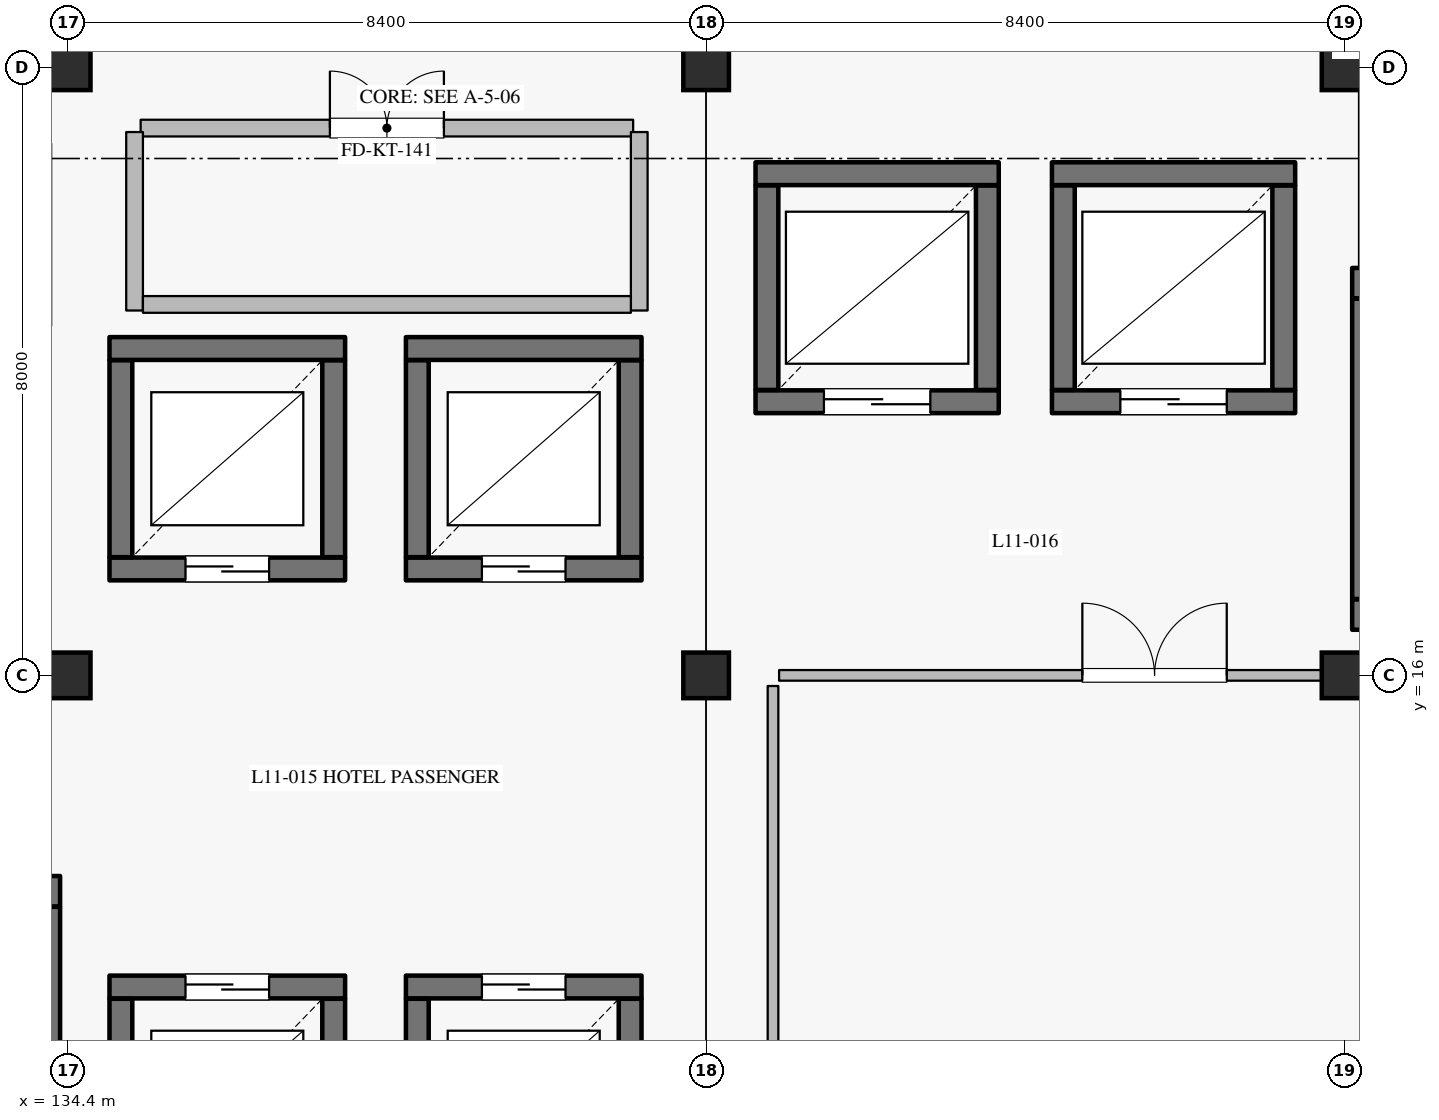
"""IFC4 building model, lengths in metres.
Left out: names, types, materials, properties, quantities, classifications, styles, units other than length and angle.
Written with IfcOpenShell. Run it as: python <this file> out.ifc"""

import sys

from ifc_helpers import new_model, si_unit, direction, frame, frame_2d, origin, origin_2d, place, context, subcontext, project, spatial, rectangle, extrude, element, fill, save


model = new_model("IFC4")
c1 = context("Model", 3, precision=1e-05, world=origin(), true_north=direction((0.0, 1.0)))
c2 = subcontext(c1, "Body", "Model", "MODEL_VIEW")
j1 = project(units=[si_unit("LENGTHUNIT", "METRE"), si_unit("PLANEANGLEUNIT", "RADIAN")], contexts=[c1])
p1 = place(None, origin())
s1 = spatial("IfcSite", under=j1, at=p1, CompositionType="ELEMENT")
p2 = place(p1, origin())
s2 = spatial("IfcBuilding", under=s1, at=p2, CompositionType="ELEMENT")
p3 = place(p2, frame((0.0, 0.0, 47.4)))
s3 = spatial("IfcBuildingStorey", under=s2, at=p3, CompositionType="ELEMENT", Elevation=47.4)
for number, where, z_axis, x_axis in (
    (1, (134.4, 16.0, 0.0), (0.0, 0.0, 1.0), (1.0, 0.0, 0.0)),
    (2, (142.8, 16.0, 0.0), (0.0, 0.0, 1.0), (1.0, 0.0, 0.0)),
    (3, (151.2, 24.0, 0.0), (0.0, 0.0, 1.0), (1.0, 0.0, 0.0)),
    (4, (134.4, 24.0, 0.0), (0.0, 0.0, 1.0), (1.0, 0.0, 0.0)),
    (5, (142.8, 24.0, 0.0), (0.0, 0.0, 1.0), (1.0, 0.0, 0.0)),
    (6, (151.2, 16.0, 0.0), (0.0, 0.0, 1.0), (1.0, 0.0, 0.0)),
):
    element("IfcColumn", number, at=place(p3, frame(where, z_axis=z_axis, x_axis=x_axis)), inside=s3, PredefinedType="COLUMN", context=c2, shape_type="SweptSolid", body=[
        extrude(rectangle(XDim=0.6, YDim=0.6, at=origin_2d()), origin(), (0.0, 0.0, 1.0), 4.2),
    ])
p4 = place(p3, frame((134.95, 17.4, 0.0), z_axis=(0.0, 0.0, 1.0), x_axis=(1.0, 0.0, 0.0)))
e7 = element("IfcWall", 7, at=p4, inside=s3, PredefinedType="SHEAR", context=c2, shape_type="SweptSolid", body=[
    extrude(rectangle(XDim=3.1, YDim=0.3, at=frame_2d((1.55, 0.0))), origin(), (0.0, 0.0, 1.0), 3.935),
])
p5 = place(p4, frame((1.0, 0.0, 0.0)))
e8 = element("IfcOpeningElement", 8, at=p5, cuts=e7, PredefinedType="OPENING", context=c2, shape_type="SweptSolid", body=[
    extrude(rectangle(XDim=1.1, YDim=2.2, at=frame_2d((0.55, 1.1))), frame((0.0, 0.16, 0.0), z_axis=(0.0, -1.0, 0.0), x_axis=(1.0, 0.0, 0.0)), (0.0, 0.0, 1.0), 0.32),
])
p6 = place(p3, frame((137.9, 17.555, 0.0), z_axis=(0.0, 0.0, 1.0), x_axis=(0.0, 1.0, 0.0)))
e9 = element("IfcWall", 9, at=p6, inside=s3, PredefinedType="SHEAR", context=c2, shape_type="SweptSolid", body=[
    extrude(rectangle(XDim=2.59, YDim=0.3, at=frame_2d((1.295, 0.0))), origin(), (0.0, 0.0, 1.0), 3.935),
])
p7 = place(p3, frame((138.05, 20.3, 0.0), z_axis=(0.0, 0.0, 1.0), x_axis=(-1.0, 0.0, 0.0)))
e10 = element("IfcWall", 10, at=p7, inside=s3, PredefinedType="SHEAR", context=c2, shape_type="SweptSolid", body=[
    extrude(rectangle(XDim=3.1, YDim=0.3, at=frame_2d((1.55, 0.0))), origin(), (0.0, 0.0, 1.0), 3.935),
])
p8 = place(p3, frame((135.1, 20.145, 0.0), z_axis=(0.0, 0.0, 1.0), x_axis=(0.0, -1.0, 0.0)))
e11 = element("IfcWall", 11, at=p8, inside=s3, PredefinedType="SHEAR", context=c2, shape_type="SweptSolid", body=[
    extrude(rectangle(XDim=2.59, YDim=0.3, at=frame_2d((1.295, 0.0))), origin(), (0.0, 0.0, 1.0), 3.935),
])
p9 = place(p3, frame((138.85, 17.4, 0.0), z_axis=(0.0, 0.0, 1.0), x_axis=(1.0, 0.0, 0.0)))
e12 = element("IfcWall", 12, at=p9, inside=s3, PredefinedType="SHEAR", context=c2, shape_type="SweptSolid", body=[
    extrude(rectangle(XDim=3.1, YDim=0.3, at=frame_2d((1.55, 0.0))), origin(), (0.0, 0.0, 1.0), 3.935),
])
p10 = place(p9, frame((1.0, 0.0, 0.0)))
e13 = element("IfcOpeningElement", 13, at=p10, cuts=e12, PredefinedType="OPENING", context=c2, shape_type="SweptSolid", body=[
    extrude(rectangle(XDim=1.1, YDim=2.2, at=frame_2d((0.55, 1.1))), frame((0.0, 0.16, 0.0), z_axis=(0.0, -1.0, 0.0), x_axis=(1.0, 0.0, 0.0)), (0.0, 0.0, 1.0), 0.32),
])
p11 = place(p3, frame((141.8, 17.555, 0.0), z_axis=(0.0, 0.0, 1.0), x_axis=(0.0, 1.0, 0.0)))
e14 = element("IfcWall", 14, at=p11, inside=s3, PredefinedType="SHEAR", context=c2, shape_type="SweptSolid", body=[
    extrude(rectangle(XDim=2.59, YDim=0.3, at=frame_2d((1.295, 0.0))), origin(), (0.0, 0.0, 1.0), 3.935),
])
p12 = place(p3, frame((141.95, 20.3, 0.0), z_axis=(0.0, 0.0, 1.0), x_axis=(-1.0, 0.0, 0.0)))
e15 = element("IfcWall", 15, at=p12, inside=s3, PredefinedType="SHEAR", context=c2, shape_type="SweptSolid", body=[
    extrude(rectangle(XDim=3.1, YDim=0.3, at=frame_2d((1.55, 0.0))), origin(), (0.0, 0.0, 1.0), 3.935),
])
for number, where, z_axis, x_axis in (
    (16, (139.0, 20.145, 0.0), (0.0, 0.0, 1.0), (0.0, -1.0, 0.0)),
    (17, (137.9, 9.155, 0.0), (0.0, 0.0, 1.0), (0.0, 1.0, 0.0)),
):
    element("IfcWall", number, at=place(p3, frame(where, z_axis=z_axis, x_axis=x_axis)), inside=s3, PredefinedType="SHEAR", context=c2, shape_type="SweptSolid", body=[
        extrude(rectangle(XDim=2.59, YDim=0.3, at=frame_2d((1.295, 0.0))), origin(), (0.0, 0.0, 1.0), 3.935),
    ])
p13 = place(p3, frame((138.05, 11.9, 0.0), z_axis=(0.0, 0.0, 1.0), x_axis=(-1.0, 0.0, 0.0)))
e18 = element("IfcWall", 18, at=p13, inside=s3, PredefinedType="SHEAR", context=c2, shape_type="SweptSolid", body=[
    extrude(rectangle(XDim=3.1, YDim=0.3, at=frame_2d((1.55, 0.0))), origin(), (0.0, 0.0, 1.0), 3.935),
])
p14 = place(p13, frame((1.0, 0.0, 0.0)))
e19 = element("IfcOpeningElement", 19, at=p14, cuts=e18, PredefinedType="OPENING", context=c2, shape_type="SweptSolid", body=[
    extrude(rectangle(XDim=1.1, YDim=2.2, at=frame_2d((0.55, 1.1))), frame((0.0, 0.16, 0.0), z_axis=(0.0, -1.0, 0.0), x_axis=(1.0, 0.0, 0.0)), (0.0, 0.0, 1.0), 0.32),
])
for number, where, z_axis, x_axis in (
    (20, (135.1, 11.745, 0.0), (0.0, 0.0, 1.0), (0.0, -1.0, 0.0)),
    (21, (141.8, 9.155, 0.0), (0.0, 0.0, 1.0), (0.0, 1.0, 0.0)),
):
    element("IfcWall", number, at=place(p3, frame(where, z_axis=z_axis, x_axis=x_axis)), inside=s3, PredefinedType="SHEAR", context=c2, shape_type="SweptSolid", body=[
        extrude(rectangle(XDim=2.59, YDim=0.3, at=frame_2d((1.295, 0.0))), origin(), (0.0, 0.0, 1.0), 3.935),
    ])
p15 = place(p3, frame((141.95, 11.9, 0.0), z_axis=(0.0, 0.0, 1.0), x_axis=(-1.0, 0.0, 0.0)))
e22 = element("IfcWall", 22, at=p15, inside=s3, PredefinedType="SHEAR", context=c2, shape_type="SweptSolid", body=[
    extrude(rectangle(XDim=3.1, YDim=0.3, at=frame_2d((1.55, 0.0))), origin(), (0.0, 0.0, 1.0), 3.935),
])
p16 = place(p15, frame((1.0, 0.0, 0.0)))
e23 = element("IfcOpeningElement", 23, at=p16, cuts=e22, PredefinedType="OPENING", context=c2, shape_type="SweptSolid", body=[
    extrude(rectangle(XDim=1.1, YDim=2.2, at=frame_2d((0.55, 1.1))), frame((0.0, 0.16, 0.0), z_axis=(0.0, -1.0, 0.0), x_axis=(1.0, 0.0, 0.0)), (0.0, 0.0, 1.0), 0.32),
])
p17 = place(p3, frame((139.0, 11.745, 0.0), z_axis=(0.0, 0.0, 1.0), x_axis=(0.0, -1.0, 0.0)))
e24 = element("IfcWall", 24, at=p17, inside=s3, PredefinedType="SHEAR", context=c2, shape_type="SweptSolid", body=[
    extrude(rectangle(XDim=2.59, YDim=0.3, at=frame_2d((1.295, 0.0))), origin(), (0.0, 0.0, 1.0), 3.935),
])
p18 = place(p3, frame((143.45, 19.6, 0.0), z_axis=(0.0, 0.0, 1.0), x_axis=(1.0, 0.0, 0.0)))
e25 = element("IfcWall", 25, at=p18, inside=s3, PredefinedType="SHEAR", context=c2, shape_type="SweptSolid", body=[
    extrude(rectangle(XDim=3.2, YDim=0.3, at=frame_2d((1.6, 0.0))), origin(), (0.0, 0.0, 1.0), 3.935),
])
p19 = place(p18, frame((0.9, 0.0, 0.0)))
e26 = element("IfcOpeningElement", 26, at=p19, cuts=e25, PredefinedType="OPENING", context=c2, shape_type="SweptSolid", body=[
    extrude(rectangle(XDim=1.4, YDim=2.35, at=frame_2d((0.7, 1.175))), frame((0.0, 0.16, 0.0), z_axis=(0.0, -1.0, 0.0), x_axis=(1.0, 0.0, 0.0)), (0.0, 0.0, 1.0), 0.32),
])
p20 = place(p3, frame((146.5, 19.755, 0.0), z_axis=(0.0, 0.0, 1.0), x_axis=(0.0, 1.0, 0.0)))
e27 = element("IfcWall", 27, at=p20, inside=s3, PredefinedType="SHEAR", context=c2, shape_type="SweptSolid", body=[
    extrude(rectangle(XDim=2.69, YDim=0.3, at=frame_2d((1.345, 0.0))), origin(), (0.0, 0.0, 1.0), 3.935),
])
p21 = place(p3, frame((146.65, 22.6, 0.0), z_axis=(0.0, 0.0, 1.0), x_axis=(-1.0, 0.0, 0.0)))
e28 = element("IfcWall", 28, at=p21, inside=s3, PredefinedType="SHEAR", context=c2, shape_type="SweptSolid", body=[
    extrude(rectangle(XDim=3.2, YDim=0.3, at=frame_2d((1.6, 0.0))), origin(), (0.0, 0.0, 1.0), 3.935),
])
p22 = place(p3, frame((143.6, 22.445, 0.0), z_axis=(0.0, 0.0, 1.0), x_axis=(0.0, -1.0, 0.0)))
e29 = element("IfcWall", 29, at=p22, inside=s3, PredefinedType="SHEAR", context=c2, shape_type="SweptSolid", body=[
    extrude(rectangle(XDim=2.69, YDim=0.3, at=frame_2d((1.345, 0.0))), origin(), (0.0, 0.0, 1.0), 3.935),
])
p23 = place(p3, frame((147.35, 19.6, 0.0), z_axis=(0.0, 0.0, 1.0), x_axis=(1.0, 0.0, 0.0)))
e30 = element("IfcWall", 30, at=p23, inside=s3, PredefinedType="SHEAR", context=c2, shape_type="SweptSolid", body=[
    extrude(rectangle(XDim=3.2, YDim=0.3, at=frame_2d((1.6, 0.0))), origin(), (0.0, 0.0, 1.0), 3.935),
])
p24 = place(p23, frame((0.9, 0.0, 0.0)))
e31 = element("IfcOpeningElement", 31, at=p24, cuts=e30, PredefinedType="OPENING", context=c2, shape_type="SweptSolid", body=[
    extrude(rectangle(XDim=1.4, YDim=2.35, at=frame_2d((0.7, 1.175))), frame((0.0, 0.16, 0.0), z_axis=(0.0, -1.0, 0.0), x_axis=(1.0, 0.0, 0.0)), (0.0, 0.0, 1.0), 0.32),
])
p25 = place(p3, frame((150.4, 19.755, 0.0), z_axis=(0.0, 0.0, 1.0), x_axis=(0.0, 1.0, 0.0)))
e32 = element("IfcWall", 32, at=p25, inside=s3, PredefinedType="SHEAR", context=c2, shape_type="SweptSolid", body=[
    extrude(rectangle(XDim=2.69, YDim=0.3, at=frame_2d((1.345, 0.0))), origin(), (0.0, 0.0, 1.0), 3.935),
])
p26 = place(p3, frame((150.55, 22.6, 0.0), z_axis=(0.0, 0.0, 1.0), x_axis=(-1.0, 0.0, 0.0)))
e33 = element("IfcWall", 33, at=p26, inside=s3, PredefinedType="SHEAR", context=c2, shape_type="SweptSolid", body=[
    extrude(rectangle(XDim=3.2, YDim=0.3, at=frame_2d((1.6, 0.0))), origin(), (0.0, 0.0, 1.0), 3.935),
])
p27 = place(p3, frame((147.5, 22.445, 0.0), z_axis=(0.0, 0.0, 1.0), x_axis=(0.0, -1.0, 0.0)))
e34 = element("IfcWall", 34, at=p27, inside=s3, PredefinedType="SHEAR", context=c2, shape_type="SweptSolid", body=[
    extrude(rectangle(XDim=2.69, YDim=0.3, at=frame_2d((1.345, 0.0))), origin(), (0.0, 0.0, 1.0), 3.935),
])
p28 = place(p3, frame((134.1, 9.005, 0.0), z_axis=(0.0, 0.0, 1.0), x_axis=(0.0, 1.0, 0.0)))
e35 = element("IfcWall", 35, at=p28, inside=s3, PredefinedType="SHEAR", context=c2, shape_type="SweptSolid", body=[
    extrude(rectangle(XDim=3.95, YDim=0.4, at=frame_2d((1.975, 0.0))), origin(), (0.0, 0.0, 1.0), 3.935),
])
p29 = place(p3, frame((126.15, 13.16, 0.0), z_axis=(0.0, 0.0, 1.0), x_axis=(1.0, 0.0, 0.0)))
e36 = element("IfcWall", 36, at=p29, inside=s3, PredefinedType="SHEAR", context=c2, shape_type="SweptSolid", body=[
    extrude(rectangle(XDim=8.15, YDim=0.4, at=frame_2d((4.075, 0.0))), origin(), (0.0, 0.0, 1.0), 3.935),
])
p30 = place(p29, frame((0.38, 0.0, 0.0)))
e37 = element("IfcOpeningElement", 37, at=p30, cuts=e36, PredefinedType="OPENING", context=c2, shape_type="SweptSolid", body=[
    extrude(rectangle(XDim=1.16, YDim=2.2, at=frame_2d((0.58, 1.1))), frame((0.0, 0.21, 0.0), z_axis=(0.0, -1.0, 0.0), x_axis=(1.0, 0.0, 0.0)), (0.0, 0.0, 1.0), 0.42),
])
p31 = place(p3, frame((151.3, 16.8, 0.0), z_axis=(0.0, 0.0, 1.0), x_axis=(1.0, 0.0, 0.0)))
e38 = element("IfcWall", 38, at=p31, inside=s3, PredefinedType="SHEAR", context=c2, shape_type="SweptSolid", body=[
    extrude(rectangle(XDim=8.15, YDim=0.4, at=frame_2d((4.075, 0.0))), origin(), (0.0, 0.0, 1.0), 3.935),
])
p32 = place(p3, frame((151.3, 21.16, 0.0), z_axis=(0.0, 0.0, 1.0), x_axis=(1.0, 0.0, 0.0)))
e39 = element("IfcWall", 39, at=p32, inside=s3, PredefinedType="SHEAR", context=c2, shape_type="SweptSolid", body=[
    extrude(rectangle(XDim=8.15, YDim=0.4, at=frame_2d((4.075, 0.0))), origin(), (0.0, 0.0, 1.0), 3.935),
])
p33 = place(p32, frame((0.43, 0.0, 0.0)))
e40 = element("IfcOpeningElement", 40, at=p33, cuts=e39, PredefinedType="OPENING", context=c2, shape_type="SweptSolid", body=[
    extrude(rectangle(XDim=1.16, YDim=2.2, at=frame_2d((0.58, 1.1))), frame((0.0, 0.21, 0.0), z_axis=(0.0, -1.0, 0.0), x_axis=(1.0, 0.0, 0.0)), (0.0, 0.0, 1.0), 0.42),
])
p34 = place(p3, frame((151.5, 17.005, 0.0), z_axis=(0.0, 0.0, 1.0), x_axis=(0.0, 1.0, 0.0)))
e41 = element("IfcWall", 41, at=p34, inside=s3, PredefinedType="SHEAR", context=c2, shape_type="SweptSolid", body=[
    extrude(rectangle(XDim=3.95, YDim=0.4, at=frame_2d((1.975, 0.0))), origin(), (0.0, 0.0, 1.0), 3.935),
])
p35 = place(p3, frame((151.5, 21.365, 0.0), z_axis=(0.0, 0.0, 1.0), x_axis=(0.0, 1.0, 0.0)))
e42 = element("IfcWall", 42, at=p35, inside=s3, PredefinedType="PARTITIONING", context=c2, shape_type="SweptSolid", body=[
    extrude(rectangle(XDim=5.82, YDim=0.22, at=frame_2d((2.91, 0.0))), origin(), (0.0, 0.0, 1.0), 3.935),
])
p36 = place(p3, frame((143.76, 16.0, 0.0), z_axis=(0.0, 0.0, 1.0), x_axis=(1.0, 0.0, 0.0)))
e43 = element("IfcWall", 43, at=p36, inside=s3, PredefinedType="PARTITIONING", context=c2, shape_type="SweptSolid", body=[
    extrude(rectangle(XDim=7.736, YDim=0.14, at=frame_2d((3.868, 0.0))), origin(), (0.0, 0.0, 1.0), 3.935),
])
p37 = place(p36, frame((3.99, 0.0, 0.0)))
e44 = element("IfcOpeningElement", 44, at=p37, cuts=e43, PredefinedType="OPENING", context=c2, shape_type="SweptSolid", body=[
    extrude(rectangle(XDim=1.9, YDim=2.4, at=frame_2d((0.95, 1.2))), frame((0.0, 0.08, 0.0), z_axis=(0.0, -1.0, 0.0), x_axis=(1.0, 0.0, 0.0)), (0.0, 0.0, 1.0), 0.16),
])
p38 = place(p3, frame((143.68, 8.85, 0.0), z_axis=(0.0, 0.0, 1.0), x_axis=(0.0, 1.0, 0.0)))
e45 = element("IfcWall", 45, at=p38, inside=s3, PredefinedType="PARTITIONING", context=c2, shape_type="SweptSolid", body=[
    extrude(rectangle(XDim=7.01, YDim=0.14, at=frame_2d((3.505, 0.0))), origin(), (0.0, 0.0, 1.0), 3.935),
])
p39 = place(p3, frame((135.36, 23.2, 0.0), z_axis=(0.0, 0.0, 1.0), x_axis=(1.0, 0.0, 0.0)))
e46 = element("IfcWall", 46, at=p39, inside=s3, PredefinedType="PARTITIONING", context=c2, shape_type="SweptSolid", body=[
    extrude(rectangle(XDim=6.48, YDim=0.22, at=frame_2d((3.24, 0.0))), origin(), (0.0, 0.0, 1.0), 3.935),
])
p40 = place(p39, frame((2.49, 0.0, 0.0)))
e47 = element("IfcOpeningElement", 47, at=p40, cuts=e46, PredefinedType="OPENING", context=c2, shape_type="SweptSolid", body=[
    extrude(rectangle(XDim=1.5, YDim=2.3, at=frame_2d((0.75, 1.15))), frame((0.0, 0.12, 0.0), z_axis=(0.0, -1.0, 0.0), x_axis=(1.0, 0.0, 0.0)), (0.0, 0.0, 1.0), 0.24),
])
for number, where, z_axis, x_axis in (
    (48, (135.28, 20.8, 0.0), (0.0, 0.0, 1.0), (0.0, 1.0, 0.0)),
    (49, (141.92, 20.8, 0.0), (0.0, 0.0, 1.0), (0.0, 1.0, 0.0)),
):
    element("IfcWall", number, at=place(p3, frame(where, z_axis=z_axis, x_axis=x_axis)), inside=s3, PredefinedType="PARTITIONING", context=c2, shape_type="SweptSolid", body=[
        extrude(rectangle(XDim=2.348, YDim=0.22, at=frame_2d((1.174, 0.0))), origin(), (0.0, 0.0, 1.0), 3.935),
    ])
p41 = place(p3, frame((135.39, 20.88, 0.0), z_axis=(0.0, 0.0, 1.0), x_axis=(1.0, 0.0, 0.0)))
e50 = element("IfcWall", 50, at=p41, inside=s3, PredefinedType="PARTITIONING", context=c2, shape_type="SweptSolid", body=[
    extrude(rectangle(XDim=6.42, YDim=0.22, at=frame_2d((3.21, 0.0))), origin(), (0.0, 0.0, 1.0), 3.935),
])
p42 = place(p5, origin())
e51 = element("IfcDoor", 51, at=p42, inside=s3, OperationType="DOUBLE_DOOR_SLIDING", PredefinedType="DOOR", context=c2, shape_type="SweptSolid", body=[
    extrude(rectangle(XDim=1.1, YDim=2.2, at=frame_2d((0.55, 1.1))), frame((0.0, 0.025, 0.0), z_axis=(0.0, -1.0, 0.0), x_axis=(1.0, 0.0, 0.0)), (0.0, 0.0, 1.0), 0.05),
])
fill(e8, e51)
p43 = place(p10, origin())
e52 = element("IfcDoor", 52, at=p43, inside=s3, OperationType="DOUBLE_DOOR_SLIDING", PredefinedType="DOOR", context=c2, shape_type="SweptSolid", body=[
    extrude(rectangle(XDim=1.1, YDim=2.2, at=frame_2d((0.55, 1.1))), frame((0.0, 0.025, 0.0), z_axis=(0.0, -1.0, 0.0), x_axis=(1.0, 0.0, 0.0)), (0.0, 0.0, 1.0), 0.05),
])
fill(e13, e52)
p44 = place(p14, origin())
e53 = element("IfcDoor", 53, at=p44, inside=s3, OperationType="DOUBLE_DOOR_SLIDING", PredefinedType="DOOR", context=c2, shape_type="SweptSolid", body=[
    extrude(rectangle(XDim=1.1, YDim=2.2, at=frame_2d((0.55, 1.1))), frame((0.0, 0.025, 0.0), z_axis=(0.0, -1.0, 0.0), x_axis=(1.0, 0.0, 0.0)), (0.0, 0.0, 1.0), 0.05),
])
fill(e19, e53)
p45 = place(p16, origin())
e54 = element("IfcDoor", 54, at=p45, inside=s3, OperationType="DOUBLE_DOOR_SLIDING", PredefinedType="DOOR", context=c2, shape_type="SweptSolid", body=[
    extrude(rectangle(XDim=1.1, YDim=2.2, at=frame_2d((0.55, 1.1))), frame((0.0, 0.025, 0.0), z_axis=(0.0, -1.0, 0.0), x_axis=(1.0, 0.0, 0.0)), (0.0, 0.0, 1.0), 0.05),
])
fill(e23, e54)
p46 = place(p19, origin())
e55 = element("IfcDoor", 55, at=p46, inside=s3, OperationType="DOUBLE_DOOR_SLIDING", PredefinedType="DOOR", context=c2, shape_type="SweptSolid", body=[
    extrude(rectangle(XDim=1.4, YDim=2.35, at=frame_2d((0.7, 1.175))), frame((0.0, 0.025, 0.0), z_axis=(0.0, -1.0, 0.0), x_axis=(1.0, 0.0, 0.0)), (0.0, 0.0, 1.0), 0.05),
])
fill(e26, e55)
p47 = place(p24, origin())
e56 = element("IfcDoor", 56, at=p47, inside=s3, OperationType="DOUBLE_DOOR_SLIDING", PredefinedType="DOOR", context=c2, shape_type="SweptSolid", body=[
    extrude(rectangle(XDim=1.4, YDim=2.35, at=frame_2d((0.7, 1.175))), frame((0.0, 0.025, 0.0), z_axis=(0.0, -1.0, 0.0), x_axis=(1.0, 0.0, 0.0)), (0.0, 0.0, 1.0), 0.05),
])
fill(e31, e56)
p48 = place(p37, origin())
e57 = element("IfcDoor", 57, at=p48, inside=s3, OperationType="DOUBLE_DOOR_SINGLE_SWING", PredefinedType="DOOR", context=c2, shape_type="SweptSolid", body=[
    extrude(rectangle(XDim=1.9, YDim=2.4, at=frame_2d((0.95, 1.2))), frame((0.0, 0.025, 0.0), z_axis=(0.0, -1.0, 0.0), x_axis=(1.0, 0.0, 0.0)), (0.0, 0.0, 1.0), 0.05),
])
fill(e44, e57)
p49 = place(p40, origin())
e58 = element("IfcDoor", 58, at=p49, inside=s3, OperationType="DOUBLE_DOOR_SINGLE_SWING", PredefinedType="DOOR", context=c2, shape_type="SweptSolid", body=[
    extrude(rectangle(XDim=1.5, YDim=2.3, at=frame_2d((0.75, 1.15))), frame((0.0, 0.025, 0.0), z_axis=(0.0, -1.0, 0.0), x_axis=(1.0, 0.0, 0.0)), (0.0, 0.0, 1.0), 0.05),
])
fill(e47, e58)
save(model, sys.argv[1])
